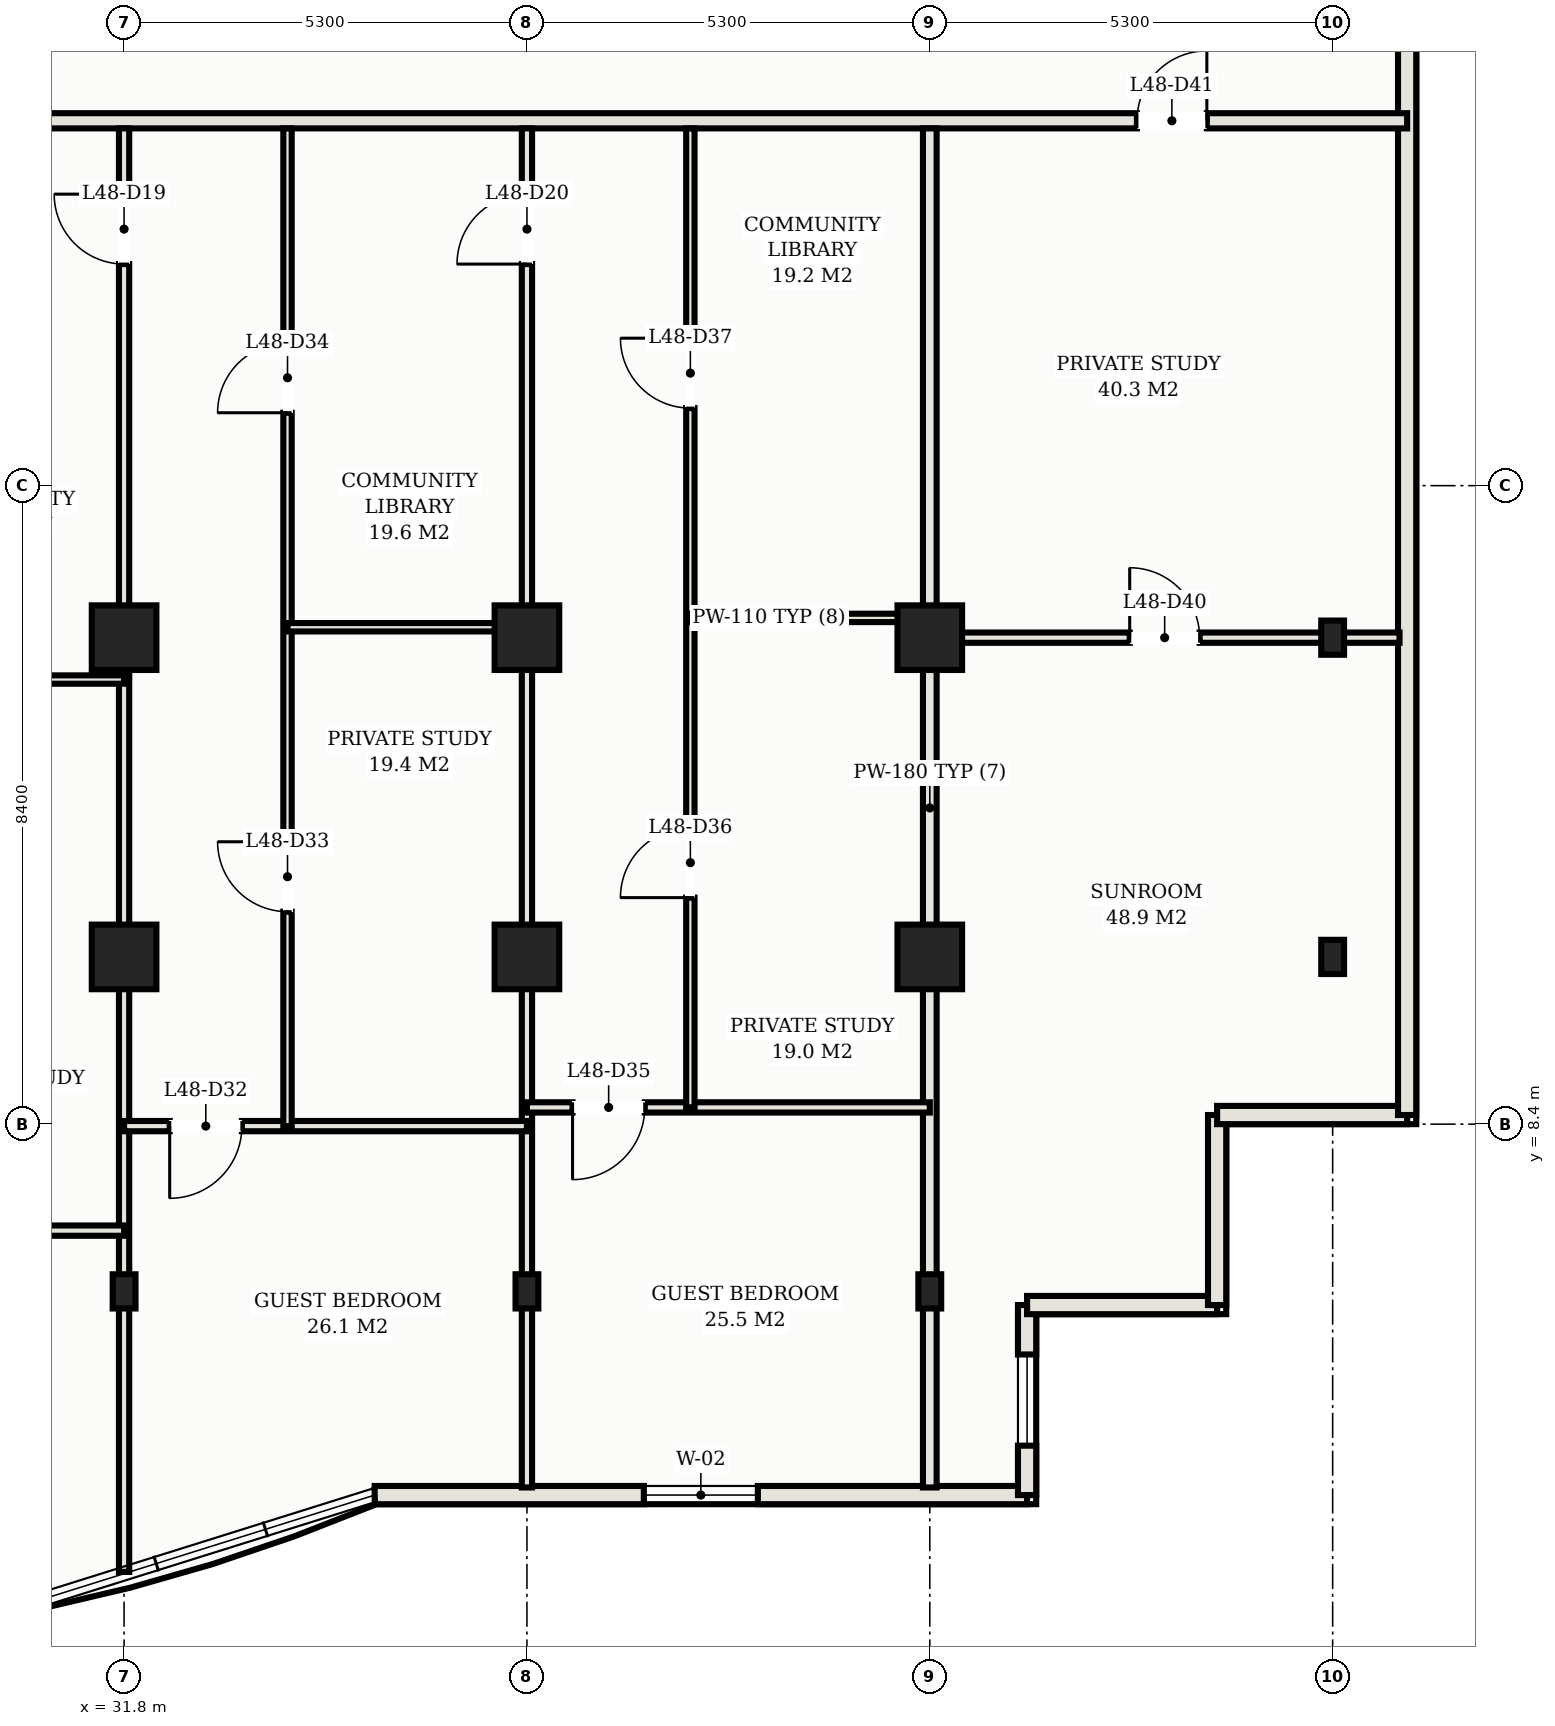
"""IFC4 building model, lengths in metres.
Left out: names, types, materials, properties, quantities, classifications, styles, units other than length and angle.
Written with IfcOpenShell. Run it as: python <this file> out.ifc"""

import sys

from ifc_helpers import new_model, si_unit, direction, frame, frame_2d, origin, origin_2d, place, context, subcontext, project, spatial, rectangle, hollow_rectangle, extrude, element, fill, save


model = new_model("IFC4")
c1 = context("Model", 3, precision=1e-05, world=origin(), true_north=direction((0.0, 1.0)))
c2 = subcontext(c1, "Body", "Model", "MODEL_VIEW")
j1 = project(units=[si_unit("LENGTHUNIT", "METRE"), si_unit("PLANEANGLEUNIT", "RADIAN")], contexts=[c1])
p1 = place(None, origin())
s1 = spatial("IfcSite", under=j1, at=p1, CompositionType="ELEMENT")
p2 = place(p1, origin())
s2 = spatial("IfcBuilding", under=s1, at=p2, CompositionType="ELEMENT")
p3 = place(p2, frame((0.0, 0.0, 175.5)))
s3 = spatial("IfcBuildingStorey", under=s2, at=p3, CompositionType="ELEMENT", Elevation=175.5)
for number, where, z_axis, x_axis in (
    (1, (31.8, 14.8, 0.0), (0.0, 0.0, 1.0), (1.0, 0.0, 0.0)),
    (2, (31.8, 10.6, 0.0), (0.0, 0.0, 1.0), (1.0, 0.0, 0.0)),
    (3, (37.1, 14.8, 0.0), (0.0, 0.0, 1.0), (1.0, 0.0, 0.0)),
    (4, (37.1, 10.6, 0.0), (0.0, 0.0, 1.0), (1.0, 0.0, 0.0)),
    (5, (42.4, 14.8, 0.0), (0.0, 0.0, 1.0), (1.0, 0.0, 0.0)),
    (6, (42.4, 10.6, 0.0), (0.0, 0.0, 1.0), (1.0, 0.0, 0.0)),
):
    element("IfcColumn", number, at=place(p3, frame(where, z_axis=z_axis, x_axis=x_axis)), inside=s3, PredefinedType="COLUMN", context=c2, shape_type="SweptSolid", body=[
        extrude(hollow_rectangle(XDim=0.85, YDim=0.85, WallThickness=0.028, at=origin_2d()), origin(), (0.0, 0.0, 1.0), 3.3),
    ])
for number, where, z_axis, x_axis in (
    (7, (31.8, 6.2, 0.0), (0.0, 0.0, 1.0), (1.0, 0.0, 0.0)),
    (8, (37.1, 6.2, 0.0), (0.0, 0.0, 1.0), (1.0, 0.0, 0.0)),
    (9, (42.4, 6.2, 0.0), (0.0, 0.0, 1.0), (1.0, 0.0, 0.0)),
    (10, (47.7, 10.6, 0.0), (0.0, 0.0, 1.0), (1.0, 0.0, 0.0)),
    (11, (47.7, 14.8, 0.0), (0.0, 0.0, 1.0), (1.0, 0.0, 0.0)),
):
    element("IfcColumn", number, at=place(p3, frame(where, z_axis=z_axis, x_axis=x_axis)), inside=s3, PredefinedType="COLUMN", context=c2, shape_type="SweptSolid", body=[
        extrude(hollow_rectangle(XDim=0.3, YDim=0.45, WallThickness=0.016, at=origin_2d()), origin(), (0.0, 0.0, 1.0), 3.3),
    ])
p4 = place(p3, frame((35.097, 3.52, 0.0), z_axis=(0.0, 0.0, 1.0), x_axis=(1.0, 0.0, 0.0)))
e12 = element("IfcWall", 12, at=p4, inside=s3, PredefinedType="SOLIDWALL", context=c2, shape_type="SweptSolid", body=[
    extrude(rectangle(XDim=8.583, YDim=0.24, at=frame_2d((4.292, 0.0))), origin(), (0.0, 0.0, 1.0), 3.1),
])
p5 = place(p4, frame((3.541, 0.0, 0.75)))
e13 = element("IfcOpeningElement", 13, at=p5, cuts=e12, PredefinedType="OPENING", context=c2, shape_type="SweptSolid", body=[
    extrude(rectangle(XDim=1.5, YDim=1.6, at=frame_2d((0.75, 0.8))), frame((0.0, 0.13, 0.0), z_axis=(0.0, -1.0, 0.0), x_axis=(1.0, 0.0, 0.0)), (0.0, 0.0, 1.0), 0.26),
])
p6 = place(p3, frame((43.68, 3.52, 0.0), z_axis=(0.0, 0.0, 1.0), x_axis=(0.0, 1.0, 0.0)))
e14 = element("IfcWall", 14, at=p6, inside=s3, PredefinedType="SOLIDWALL", context=c2, shape_type="SweptSolid", body=[
    extrude(rectangle(XDim=2.5, YDim=0.24, at=frame_2d((1.25, 0.0))), origin(), (0.0, 0.0, 1.0), 3.1),
])
p7 = place(p6, frame((0.65, 0.0, 0.75)))
e15 = element("IfcOpeningElement", 15, at=p7, cuts=e14, PredefinedType="OPENING", context=c2, shape_type="SweptSolid", body=[
    extrude(rectangle(XDim=1.2, YDim=1.5, at=frame_2d((0.6, 0.75))), frame((0.0, 0.13, 0.0), z_axis=(0.0, -1.0, 0.0), x_axis=(1.0, 0.0, 0.0)), (0.0, 0.0, 1.0), 0.26),
])
for number, where, z_axis, x_axis in (
    (16, (43.68, 6.02, 0.0), (0.0, 0.0, 1.0), (1.0, 0.0, 0.0)),
    (17, (46.18, 6.02, 0.0), (0.0, 0.0, 1.0), (0.0, 1.0, 0.0)),
    (18, (46.18, 8.52, 0.0), (0.0, 0.0, 1.0), (1.0, 0.0, 0.0)),
):
    element("IfcWall", number, at=place(p3, frame(where, z_axis=z_axis, x_axis=x_axis)), inside=s3, PredefinedType="SOLIDWALL", context=c2, shape_type="SweptSolid", body=[
        extrude(rectangle(XDim=2.5, YDim=0.24, at=frame_2d((1.25, 0.0))), origin(), (0.0, 0.0, 1.0), 3.1),
    ])
p8 = place(p3, frame((48.68, 8.52, 0.0), z_axis=(0.0, 0.0, 1.0), x_axis=(0.0, 1.0, 0.0)))
e19 = element("IfcWall", 19, at=p8, inside=s3, PredefinedType="SOLIDWALL", context=c2, shape_type="SweptSolid", body=[
    extrude(rectangle(XDim=27.41, YDim=0.24, at=frame_2d((13.705, 0.0))), origin(), (0.0, 0.0, 1.0), 3.1),
])
p9 = place(p8, frame((19.48, 0.0, 0.0)))
e20 = element("IfcOpeningElement", 20, at=p9, cuts=e19, PredefinedType="OPENING", context=c2, shape_type="SweptSolid", body=[
    extrude(rectangle(XDim=1.8, YDim=2.2, at=frame_2d((0.9, 1.1))), frame((0.0, 0.13, 0.0), z_axis=(0.0, -1.0, 0.0), x_axis=(1.0, 0.0, 0.0)), (0.0, 0.0, 1.0), 0.26),
])
p10 = place(p3, frame((4.32, 21.6, 0.0), z_axis=(0.0, 0.0, 1.0), x_axis=(1.0, 0.0, 0.0)))
e21 = element("IfcWall", 21, at=p10, inside=s3, PredefinedType="PARTITIONING", context=c2, shape_type="SweptSolid", body=[
    extrude(rectangle(XDim=44.36, YDim=0.2, at=frame_2d((22.18, 0.0))), origin(), (0.0, 0.0, 1.0), 2.38),
])
p11 = place(p10, frame((7.03, 0.0, 0.0)))
e22 = element("IfcOpeningElement", 22, at=p11, cuts=e21, PredefinedType="OPENING", context=c2, shape_type="SweptSolid", body=[
    extrude(rectangle(XDim=1.1, YDim=2.25, at=frame_2d((0.55, 1.125))), frame((0.0, 0.11, 0.0), z_axis=(0.0, -1.0, 0.0), x_axis=(1.0, 0.0, 0.0)), (0.0, 0.0, 1.0), 0.22),
])
p12 = place(p10, frame((2.635, 0.0, 0.0)))
e23 = element("IfcOpeningElement", 23, at=p12, cuts=e21, PredefinedType="OPENING", context=c2, shape_type="SweptSolid", body=[
    extrude(rectangle(XDim=0.92, YDim=2.15, at=frame_2d((0.46, 1.075))), frame((0.0, 0.11, 0.0), z_axis=(0.0, -1.0, 0.0), x_axis=(1.0, 0.0, 0.0)), (0.0, 0.0, 1.0), 0.22),
])
p13 = place(p10, frame((40.805, 0.0, 0.0)))
e24 = element("IfcOpeningElement", 24, at=p13, cuts=e21, PredefinedType="OPENING", context=c2, shape_type="SweptSolid", body=[
    extrude(rectangle(XDim=0.92, YDim=2.15, at=frame_2d((0.46, 1.075))), frame((0.0, 0.11, 0.0), z_axis=(0.0, -1.0, 0.0), x_axis=(1.0, 0.0, 0.0)), (0.0, 0.0, 1.0), 0.22),
])
p14 = place(p3, frame((42.4, 3.62, 0.0), z_axis=(0.0, 0.0, 1.0), x_axis=(0.0, 1.0, 0.0)))
e25 = element("IfcWall", 25, at=p14, inside=s3, PredefinedType="PARTITIONING", context=c2, shape_type="SweptSolid", body=[
    extrude(rectangle(XDim=17.88, YDim=0.18, at=frame_2d((8.94, 0.0))), origin(), (0.0, 0.0, 1.0), 2.38),
])
p15 = place(p3, frame((31.8, 2.509, 0.0), z_axis=(0.0, 0.0, 1.0), x_axis=(0.0, 1.0, 0.0)))
e26 = element("IfcWall", 26, at=p15, inside=s3, PredefinedType="PARTITIONING", context=c2, shape_type="SweptSolid", body=[
    extrude(rectangle(XDim=18.991, YDim=0.135, at=frame_2d((9.496, 0.0))), origin(), (0.0, 0.0, 1.0), 2.38),
])
p16 = place(p15, frame((17.206, 0.0, 0.0)))
e27 = element("IfcOpeningElement", 27, at=p16, cuts=e26, PredefinedType="OPENING", context=c2, shape_type="SweptSolid", body=[
    extrude(rectangle(XDim=0.92, YDim=2.15, at=frame_2d((0.46, 1.075))), frame((0.0, 0.078, 0.0), z_axis=(0.0, -1.0, 0.0), x_axis=(1.0, 0.0, 0.0)), (0.0, 0.0, 1.0), 0.155),
])
p17 = place(p3, frame((37.1, 3.62, 0.0), z_axis=(0.0, 0.0, 1.0), x_axis=(0.0, 1.0, 0.0)))
e28 = element("IfcWall", 28, at=p17, inside=s3, PredefinedType="PARTITIONING", context=c2, shape_type="SweptSolid", body=[
    extrude(rectangle(XDim=17.88, YDim=0.135, at=frame_2d((8.94, 0.0))), origin(), (0.0, 0.0, 1.0), 2.38),
])
p18 = place(p17, frame((16.095, 0.0, 0.0)))
e29 = element("IfcOpeningElement", 29, at=p18, cuts=e28, PredefinedType="OPENING", context=c2, shape_type="SweptSolid", body=[
    extrude(rectangle(XDim=0.92, YDim=2.15, at=frame_2d((0.46, 1.075))), frame((0.0, 0.078, 0.0), z_axis=(0.0, -1.0, 0.0), x_axis=(1.0, 0.0, 0.0)), (0.0, 0.0, 1.0), 0.155),
])
p19 = place(p3, frame((26.5, 6.999, 0.0), z_axis=(0.0, 0.0, 1.0), x_axis=(1.0, 0.0, 0.0)))
e30 = element("IfcWall", 30, at=p19, inside=s3, PredefinedType="PARTITIONING", context=c2, shape_type="SweptSolid", body=[
    extrude(rectangle(XDim=5.3, YDim=0.135, at=frame_2d((2.65, 0.0))), origin(), (0.0, 0.0, 1.0), 2.38),
])
p20 = place(p19, frame((0.8, 0.0, 0.0)))
e31 = element("IfcOpeningElement", 31, at=p20, cuts=e30, PredefinedType="OPENING", context=c2, shape_type="SweptSolid", body=[
    extrude(rectangle(XDim=0.95, YDim=2.15, at=frame_2d((0.475, 1.075))), frame((0.0, 0.078, 0.0), z_axis=(0.0, -1.0, 0.0), x_axis=(1.0, 0.0, 0.0)), (0.0, 0.0, 1.0), 0.155),
])
p21 = place(p3, frame((28.65, 14.249, 0.0), z_axis=(0.0, 0.0, 1.0), x_axis=(1.0, 0.0, 0.0)))
e32 = element("IfcWall", 32, at=p21, inside=s3, PredefinedType="MOVABLE", context=c2, shape_type="SweptSolid", body=[
    extrude(rectangle(XDim=3.15, YDim=0.11, at=frame_2d((1.575, 0.0))), origin(), (0.0, 0.0, 1.0), 2.38),
])
p22 = place(p3, frame((31.8, 8.374, 0.0), z_axis=(0.0, 0.0, 1.0), x_axis=(1.0, 0.0, 0.0)))
e33 = element("IfcWall", 33, at=p22, inside=s3, PredefinedType="PARTITIONING", context=c2, shape_type="SweptSolid", body=[
    extrude(rectangle(XDim=5.3, YDim=0.135, at=frame_2d((2.65, 0.0))), origin(), (0.0, 0.0, 1.0), 2.38),
])
p23 = place(p22, frame((0.6, 0.0, 0.0)))
e34 = element("IfcOpeningElement", 34, at=p23, cuts=e33, PredefinedType="OPENING", context=c2, shape_type="SweptSolid", body=[
    extrude(rectangle(XDim=0.95, YDim=2.15, at=frame_2d((0.475, 1.075))), frame((0.0, 0.078, 0.0), z_axis=(0.0, -1.0, 0.0), x_axis=(1.0, 0.0, 0.0)), (0.0, 0.0, 1.0), 0.155),
])
p24 = place(p3, frame((33.95, 8.374, 0.0), z_axis=(0.0, 0.0, 1.0), x_axis=(0.0, 1.0, 0.0)))
e35 = element("IfcWall", 35, at=p24, inside=s3, PredefinedType="MOVABLE", context=c2, shape_type="SweptSolid", body=[
    extrude(rectangle(XDim=13.126, YDim=0.11, at=frame_2d((6.563, 0.0))), origin(), (0.0, 0.0, 1.0), 2.38),
])
p25 = place(p24, frame((2.821, 0.0, 0.0)))
e36 = element("IfcOpeningElement", 36, at=p25, cuts=e35, PredefinedType="OPENING", context=c2, shape_type="SweptSolid", body=[
    extrude(rectangle(XDim=0.92, YDim=2.15, at=frame_2d((0.46, 1.075))), frame((0.0, 0.065, 0.0), z_axis=(0.0, -1.0, 0.0), x_axis=(1.0, 0.0, 0.0)), (0.0, 0.0, 1.0), 0.13),
])
p26 = place(p24, frame((9.385, 0.0, 0.0)))
e37 = element("IfcOpeningElement", 37, at=p26, cuts=e35, PredefinedType="OPENING", context=c2, shape_type="SweptSolid", body=[
    extrude(rectangle(XDim=0.92, YDim=2.15, at=frame_2d((0.46, 1.075))), frame((0.0, 0.065, 0.0), z_axis=(0.0, -1.0, 0.0), x_axis=(1.0, 0.0, 0.0)), (0.0, 0.0, 1.0), 0.13),
])
p27 = place(p3, frame((33.95, 14.937, 0.0), z_axis=(0.0, 0.0, 1.0), x_axis=(1.0, 0.0, 0.0)))
e38 = element("IfcWall", 38, at=p27, inside=s3, PredefinedType="MOVABLE", context=c2, shape_type="SweptSolid", body=[
    extrude(rectangle(XDim=3.15, YDim=0.11, at=frame_2d((1.575, 0.0))), origin(), (0.0, 0.0, 1.0), 2.38),
])
p28 = place(p3, frame((37.1, 8.62, 0.0), z_axis=(0.0, 0.0, 1.0), x_axis=(1.0, 0.0, 0.0)))
e39 = element("IfcWall", 39, at=p28, inside=s3, PredefinedType="PARTITIONING", context=c2, shape_type="SweptSolid", body=[
    extrude(rectangle(XDim=5.3, YDim=0.135, at=frame_2d((2.65, 0.0))), origin(), (0.0, 0.0, 1.0), 2.38),
])
p29 = place(p28, frame((0.6, 0.0, 0.0)))
e40 = element("IfcOpeningElement", 40, at=p29, cuts=e39, PredefinedType="OPENING", context=c2, shape_type="SweptSolid", body=[
    extrude(rectangle(XDim=0.95, YDim=2.15, at=frame_2d((0.475, 1.075))), frame((0.0, 0.078, 0.0), z_axis=(0.0, -1.0, 0.0), x_axis=(1.0, 0.0, 0.0)), (0.0, 0.0, 1.0), 0.155),
])
p30 = place(p3, frame((39.25, 8.62, 0.0), z_axis=(0.0, 0.0, 1.0), x_axis=(0.0, 1.0, 0.0)))
e41 = element("IfcWall", 41, at=p30, inside=s3, PredefinedType="MOVABLE", context=c2, shape_type="SweptSolid", body=[
    extrude(rectangle(XDim=12.88, YDim=0.11, at=frame_2d((6.44, 0.0))), origin(), (0.0, 0.0, 1.0), 2.38),
])
p31 = place(p30, frame((2.76, 0.0, 0.0)))
e42 = element("IfcOpeningElement", 42, at=p31, cuts=e41, PredefinedType="OPENING", context=c2, shape_type="SweptSolid", body=[
    extrude(rectangle(XDim=0.92, YDim=2.15, at=frame_2d((0.46, 1.075))), frame((0.0, 0.065, 0.0), z_axis=(0.0, -1.0, 0.0), x_axis=(1.0, 0.0, 0.0)), (0.0, 0.0, 1.0), 0.13),
])
p32 = place(p30, frame((9.2, 0.0, 0.0)))
e43 = element("IfcOpeningElement", 43, at=p32, cuts=e41, PredefinedType="OPENING", context=c2, shape_type="SweptSolid", body=[
    extrude(rectangle(XDim=0.92, YDim=2.15, at=frame_2d((0.46, 1.075))), frame((0.0, 0.065, 0.0), z_axis=(0.0, -1.0, 0.0), x_axis=(1.0, 0.0, 0.0)), (0.0, 0.0, 1.0), 0.13),
])
p33 = place(p3, frame((39.25, 15.06, 0.0), z_axis=(0.0, 0.0, 1.0), x_axis=(1.0, 0.0, 0.0)))
e44 = element("IfcWall", 44, at=p33, inside=s3, PredefinedType="MOVABLE", context=c2, shape_type="SweptSolid", body=[
    extrude(rectangle(XDim=3.15, YDim=0.11, at=frame_2d((1.575, 0.0))), origin(), (0.0, 0.0, 1.0), 2.38),
])
p34 = place(p3, frame((42.4, 14.8, 0.0), z_axis=(0.0, 0.0, 1.0), x_axis=(1.0, 0.0, 0.0)))
e45 = element("IfcWall", 45, at=p34, inside=s3, PredefinedType="PARTITIONING", context=c2, shape_type="SweptSolid", body=[
    extrude(rectangle(XDim=6.18, YDim=0.135, at=frame_2d((3.09, 0.0))), origin(), (0.0, 0.0, 1.0), 2.38),
])
p35 = place(p34, frame((2.63, 0.0, 0.0)))
e46 = element("IfcOpeningElement", 46, at=p35, cuts=e45, PredefinedType="OPENING", context=c2, shape_type="SweptSolid", body=[
    extrude(rectangle(XDim=0.92, YDim=2.15, at=frame_2d((0.46, 1.075))), frame((0.0, 0.078, 0.0), z_axis=(0.0, -1.0, 0.0), x_axis=(1.0, 0.0, 0.0)), (0.0, 0.0, 1.0), 0.155),
])
p36 = place(p5, origin())
e47 = element("IfcWindow", 47, at=p36, inside=s3, PartitioningType="SINGLE_PANEL", PredefinedType="WINDOW", context=c2, shape_type="SweptSolid", body=[
    extrude(rectangle(XDim=1.5, YDim=1.6, at=frame_2d((0.75, 0.8))), frame((0.0, 0.03, 0.0), z_axis=(0.0, -1.0, 0.0), x_axis=(1.0, 0.0, 0.0)), (0.0, 0.0, 1.0), 0.06),
])
fill(e13, e47)
p37 = place(p7, origin())
e48 = element("IfcWindow", 48, at=p37, inside=s3, PartitioningType="SINGLE_PANEL", PredefinedType="WINDOW", context=c2, shape_type="SweptSolid", body=[
    extrude(rectangle(XDim=1.2, YDim=1.5, at=frame_2d((0.6, 0.75))), frame((0.0, 0.03, 0.0), z_axis=(0.0, -1.0, 0.0), x_axis=(1.0, 0.0, 0.0)), (0.0, 0.0, 1.0), 0.06),
])
fill(e15, e48)
p38 = place(p16, origin())
e49 = element("IfcDoor", 49, at=p38, inside=s3, OperationType="SINGLE_SWING_RIGHT", PredefinedType="DOOR", context=c2, shape_type="SweptSolid", body=[
    extrude(rectangle(XDim=0.92, YDim=2.15, at=frame_2d((0.46, 1.075))), frame((0.0, 0.025, 0.0), z_axis=(0.0, -1.0, 0.0), x_axis=(1.0, 0.0, 0.0)), (0.0, 0.0, 1.0), 0.05),
])
fill(e27, e49)
p39 = place(p18, origin())
e50 = element("IfcDoor", 50, at=p39, inside=s3, OperationType="SINGLE_SWING_LEFT", PredefinedType="DOOR", context=c2, shape_type="SweptSolid", body=[
    extrude(rectangle(XDim=0.92, YDim=2.15, at=frame_2d((0.46, 1.075))), frame((0.0, 0.025, 0.0), z_axis=(0.0, -1.0, 0.0), x_axis=(1.0, 0.0, 0.0)), (0.0, 0.0, 1.0), 0.05),
])
fill(e29, e50)
p40 = place(p23, frame((0.95, 0.0, 0.0), z_axis=(0.0, 0.0, 1.0), x_axis=(-1.0, 0.0, 0.0)))
e51 = element("IfcDoor", 51, at=p40, inside=s3, OperationType="SINGLE_SWING_RIGHT", PredefinedType="DOOR", context=c2, shape_type="SweptSolid", body=[
    extrude(rectangle(XDim=0.95, YDim=2.15, at=frame_2d((0.475, 1.075))), frame((0.0, 0.025, 0.0), z_axis=(0.0, -1.0, 0.0), x_axis=(1.0, 0.0, 0.0)), (0.0, 0.0, 1.0), 0.05),
])
fill(e34, e51)
p41 = place(p25, origin())
e52 = element("IfcDoor", 52, at=p41, inside=s3, OperationType="SINGLE_SWING_RIGHT", PredefinedType="DOOR", context=c2, shape_type="SweptSolid", body=[
    extrude(rectangle(XDim=0.92, YDim=2.15, at=frame_2d((0.46, 1.075))), frame((0.0, 0.025, 0.0), z_axis=(0.0, -1.0, 0.0), x_axis=(1.0, 0.0, 0.0)), (0.0, 0.0, 1.0), 0.05),
])
fill(e36, e52)
p42 = place(p26, origin())
e53 = element("IfcDoor", 53, at=p42, inside=s3, OperationType="SINGLE_SWING_LEFT", PredefinedType="DOOR", context=c2, shape_type="SweptSolid", body=[
    extrude(rectangle(XDim=0.92, YDim=2.15, at=frame_2d((0.46, 1.075))), frame((0.0, 0.025, 0.0), z_axis=(0.0, -1.0, 0.0), x_axis=(1.0, 0.0, 0.0)), (0.0, 0.0, 1.0), 0.05),
])
fill(e37, e53)
p43 = place(p29, frame((0.95, 0.0, 0.0), z_axis=(0.0, 0.0, 1.0), x_axis=(-1.0, 0.0, 0.0)))
e54 = element("IfcDoor", 54, at=p43, inside=s3, OperationType="SINGLE_SWING_RIGHT", PredefinedType="DOOR", context=c2, shape_type="SweptSolid", body=[
    extrude(rectangle(XDim=0.95, YDim=2.15, at=frame_2d((0.475, 1.075))), frame((0.0, 0.025, 0.0), z_axis=(0.0, -1.0, 0.0), x_axis=(1.0, 0.0, 0.0)), (0.0, 0.0, 1.0), 0.05),
])
fill(e40, e54)
p44 = place(p31, origin())
e55 = element("IfcDoor", 55, at=p44, inside=s3, OperationType="SINGLE_SWING_LEFT", PredefinedType="DOOR", context=c2, shape_type="SweptSolid", body=[
    extrude(rectangle(XDim=0.92, YDim=2.15, at=frame_2d((0.46, 1.075))), frame((0.0, 0.025, 0.0), z_axis=(0.0, -1.0, 0.0), x_axis=(1.0, 0.0, 0.0)), (0.0, 0.0, 1.0), 0.05),
])
fill(e42, e55)
p45 = place(p32, origin())
e56 = element("IfcDoor", 56, at=p45, inside=s3, OperationType="SINGLE_SWING_RIGHT", PredefinedType="DOOR", context=c2, shape_type="SweptSolid", body=[
    extrude(rectangle(XDim=0.92, YDim=2.15, at=frame_2d((0.46, 1.075))), frame((0.0, 0.025, 0.0), z_axis=(0.0, -1.0, 0.0), x_axis=(1.0, 0.0, 0.0)), (0.0, 0.0, 1.0), 0.05),
])
fill(e43, e56)
p46 = place(p35, origin())
e57 = element("IfcDoor", 57, at=p46, inside=s3, OperationType="SINGLE_SWING_LEFT", PredefinedType="DOOR", context=c2, shape_type="SweptSolid", body=[
    extrude(rectangle(XDim=0.92, YDim=2.15, at=frame_2d((0.46, 1.075))), frame((0.0, 0.025, 0.0), z_axis=(0.0, -1.0, 0.0), x_axis=(1.0, 0.0, 0.0)), (0.0, 0.0, 1.0), 0.05),
])
fill(e46, e57)
p47 = place(p13, origin())
e58 = element("IfcDoor", 58, at=p47, inside=s3, OperationType="SINGLE_SWING_RIGHT", PredefinedType="DOOR", context=c2, shape_type="SweptSolid", body=[
    extrude(rectangle(XDim=0.92, YDim=2.15, at=frame_2d((0.46, 1.075))), frame((0.0, 0.025, 0.0), z_axis=(0.0, -1.0, 0.0), x_axis=(1.0, 0.0, 0.0)), (0.0, 0.0, 1.0), 0.05),
])
fill(e24, e58)
save(model, sys.argv[1])
